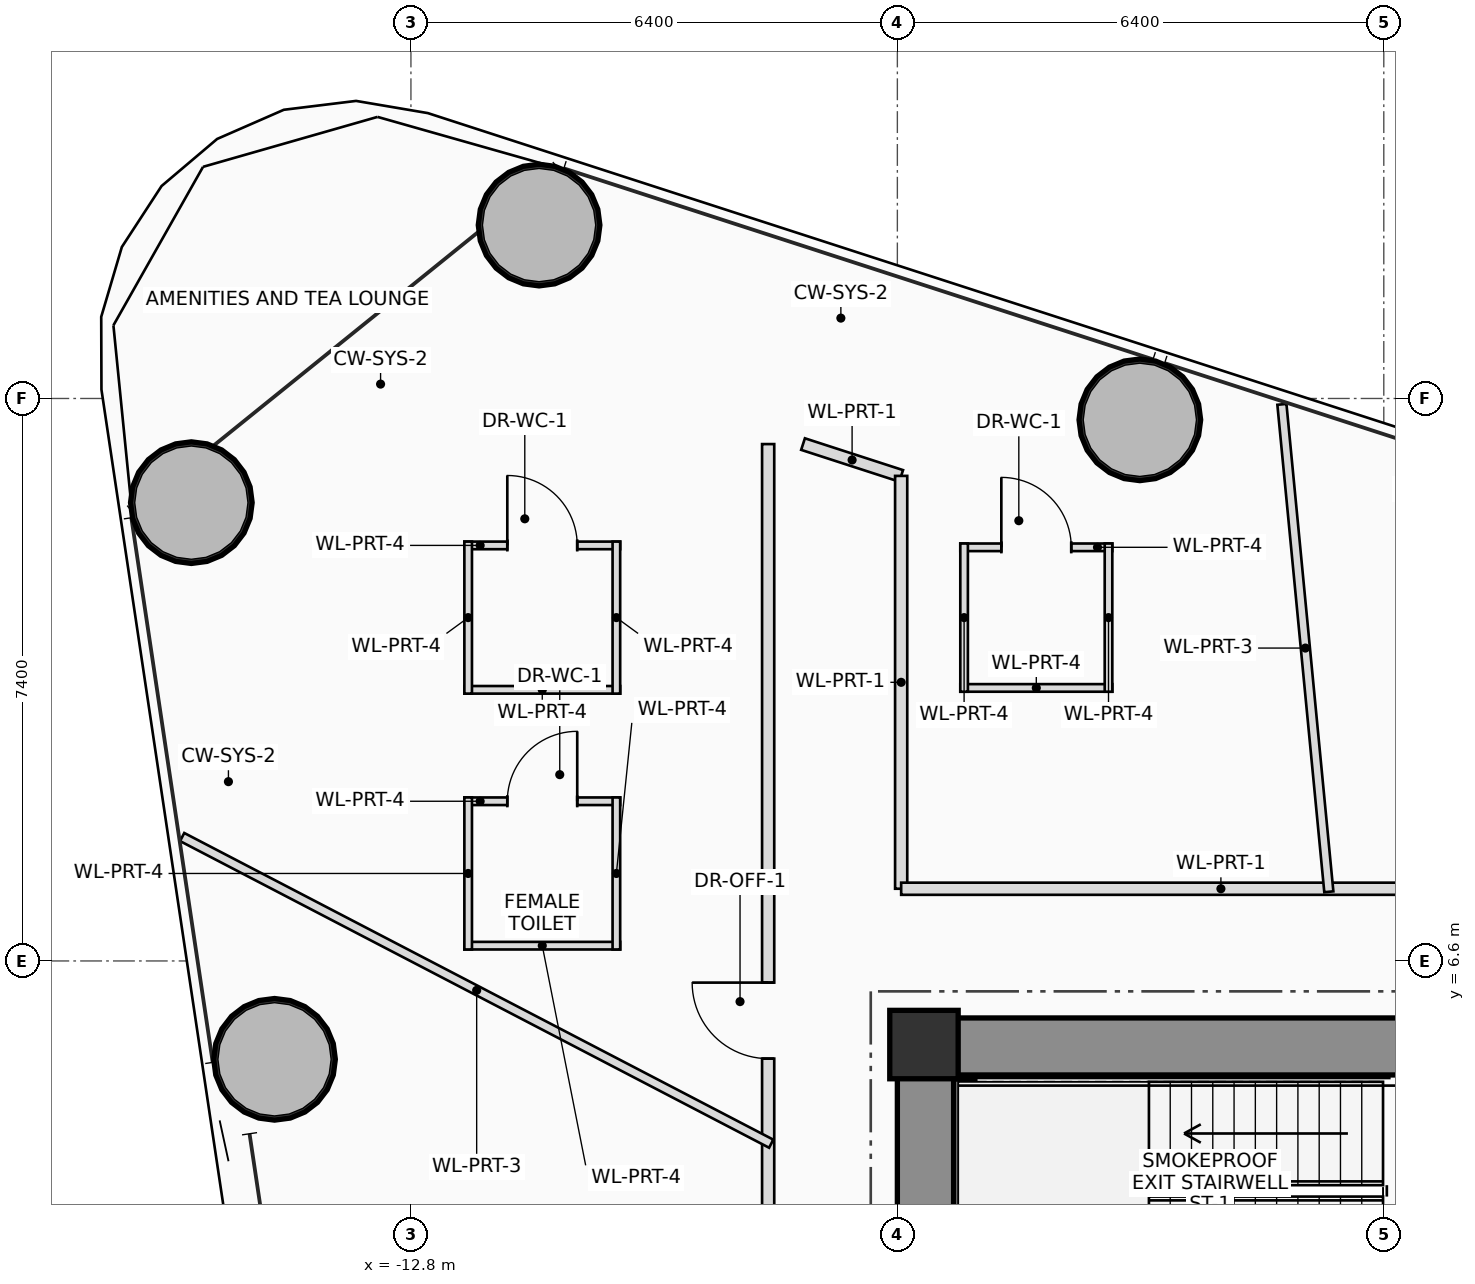
"""IFC4 building model, lengths in metres.
Left out: names, types, materials, properties, quantities, classifications, styles, units other than length and angle.
Written with IfcOpenShell. Run it as: python <this file> out.ifc"""

import sys

from ifc_helpers import new_model, si_unit, direction, frame, frame_2d, origin, origin_2d, place, context, subcontext, project, spatial, rectangle, hollow_circle, extrude, source, transform, mapped, element, fill, save


model = new_model("IFC4")
c1 = context("Model", 3, precision=1e-05, world=origin(), true_north=direction((0.0, 1.0)))
c2 = subcontext(c1, "Body", "Model", "MODEL_VIEW")
j1 = project(units=[si_unit("LENGTHUNIT", "METRE"), si_unit("PLANEANGLEUNIT", "RADIAN")], contexts=[c1])
p1 = place(None, origin())
s1 = spatial("IfcSite", under=j1, at=p1, CompositionType="ELEMENT")
p2 = place(p1, origin())
s2 = spatial("IfcBuilding", under=s1, at=p2, CompositionType="ELEMENT")
p3 = place(p2, frame((0.0, 0.0, 69.8)))
s3 = spatial("IfcBuildingStorey", under=s2, at=p3, CompositionType="ELEMENT", Elevation=69.8)
m1 = source(origin(), c2, "Body", "SweptSolid", [
    extrude(rectangle(XDim=0.9, YDim=0.9, at=origin_2d()), origin(), (0.0, 0.0, 1.0), 3.75),
])
p4 = place(p3, frame((-6.05, 5.5, 0.0), z_axis=(0.0, 0.0, 1.0), x_axis=(1.0, 0.0, 0.0)))
e1 = element("IfcColumn", 1, at=p4, inside=s3, PredefinedType="COLUMN", context=c2, shape_type="MappedRepresentation", body=[
    mapped(m1, transform((0.0, 0.0, 0.0), scale=1.0)),
])
p5 = place(p3, frame((-6.4, 5.475, 0.0), z_axis=(0.0, 0.0, 1.0), x_axis=(1.0, 0.0, 0.0)))
e2 = element("IfcWall", 2, at=p5, inside=s3, PredefinedType="SHEAR", context=c2, shape_type="SweptSolid", body=[
    extrude(rectangle(XDim=12.8, YDim=0.75, at=frame_2d((6.4, 0.0))), origin(), (0.0, 0.0, 1.0), 3.75),
])
p6 = place(p5, frame((8.6, 0.0, 0.0)))
e3 = element("IfcOpeningElement", 3, at=p6, cuts=e2, PredefinedType="OPENING", context=c2, shape_type="SweptSolid", body=[
    extrude(rectangle(XDim=1.2, YDim=2.2, at=frame_2d((0.6, 1.1))), frame((0.0, 0.385, 0.0), z_axis=(0.0, -1.0, 0.0), x_axis=(1.0, 0.0, 0.0)), (0.0, 0.0, 1.0), 0.77),
])
p7 = place(p3, frame((-6.025, 1.75, 0.0), z_axis=(0.0, 0.0, 1.0), x_axis=(0.0, 1.0, 0.0)))
e4 = element("IfcWall", 4, at=p7, inside=s3, PredefinedType="SHEAR", context=c2, shape_type="SweptSolid", body=[
    extrude(rectangle(XDim=3.35, YDim=0.75, at=frame_2d((1.675, 0.0))), origin(), (0.0, 0.0, 1.0), 3.75),
])
p8 = place(p3, frame((-5.52, 2.3, 0.0), z_axis=(0.0, 0.0, 1.0), x_axis=(0.0, 1.0, 0.0)))
e5 = element("IfcWall", 5, at=p8, inside=s3, PredefinedType="SHEAR", context=c2, shape_type="SweptSolid", body=[
    extrude(rectangle(XDim=2.75, YDim=0.28, at=frame_2d((1.375, 0.0))), origin(), (0.0, 0.0, 1.0), 3.75),
])
m2 = source(origin(), c2, "Body", "SweptSolid", [
    extrude(hollow_circle(Radius=0.8, WallThickness=0.055, at=origin_2d()), origin(), (0.0, 0.0, 1.0), 3.75),
])
for number, where, z_axis, x_axis in (
    (6, (-3.21, 13.719, 0.0), (0.0, 0.0, 1.0), (1.0, 0.0, 0.0)),
    (7, (-11.114, 16.281, 0.0), (0.0, 0.0, 1.0), (1.0, 0.0, 0.0)),
    (8, (-15.689, 12.629, 0.0), (0.0, 0.0, 1.0), (1.0, 0.0, 0.0)),
    (9, (-14.594, 5.306, 0.0), (0.0, 0.0, 1.0), (1.0, 0.0, 0.0)),
):
    element("IfcColumn", number, at=place(p3, frame(where, z_axis=z_axis, x_axis=x_axis)), inside=s3, PredefinedType="COLUMN", context=c2, shape_type="MappedRepresentation", body=[
        mapped(m2, transform((0.0, 0.0, 0.0), scale=1.0)),
    ])
p9 = place(p3, frame((-12.097, 12.067, 0.0), z_axis=(0.0, 0.0, 1.0), x_axis=(1.0, 0.0, 0.0)))
e10 = element("IfcWall", 10, at=p9, inside=s3, PredefinedType="PARTITIONING", context=c2, shape_type="SweptSolid", body=[
    extrude(rectangle(XDim=2.05, YDim=0.1, at=frame_2d((1.025, 0.0))), origin(), (0.0, 0.0, 1.0), 3.2),
])
p10 = place(p9, frame((0.565, 0.0, 0.0)))
e11 = element("IfcOpeningElement", 11, at=p10, cuts=e10, PredefinedType="OPENING", context=c2, shape_type="SweptSolid", body=[
    extrude(rectangle(XDim=0.92, YDim=2.1, at=frame_2d((0.46, 1.05))), frame((0.0, 0.06, 0.0), z_axis=(0.0, -1.0, 0.0), x_axis=(1.0, 0.0, 0.0)), (0.0, 0.0, 1.0), 0.12),
])
p11 = place(p3, frame((-10.047, 10.167, 0.0), z_axis=(0.0, 0.0, 1.0), x_axis=(-1.0, 0.0, 0.0)))
e12 = element("IfcWall", 12, at=p11, inside=s3, PredefinedType="PARTITIONING", context=c2, shape_type="SweptSolid", body=[
    extrude(rectangle(XDim=2.05, YDim=0.1, at=frame_2d((1.025, 0.0))), origin(), (0.0, 0.0, 1.0), 3.545),
])
p12 = place(p3, frame((-10.097, 12.117, 0.0), z_axis=(0.0, 0.0, 1.0), x_axis=(0.0, -1.0, 0.0)))
e13 = element("IfcWall", 13, at=p12, inside=s3, PredefinedType="PARTITIONING", context=c2, shape_type="SweptSolid", body=[
    extrude(rectangle(XDim=2.0, YDim=0.1, at=frame_2d((1.0, 0.0))), origin(), (0.0, 0.0, 1.0), 3.545),
])
p13 = place(p3, frame((-12.047, 10.117, 0.0), z_axis=(0.0, 0.0, 1.0), x_axis=(0.0, 1.0, 0.0)))
e14 = element("IfcWall", 14, at=p13, inside=s3, PredefinedType="PARTITIONING", context=c2, shape_type="SweptSolid", body=[
    extrude(rectangle(XDim=2.0, YDim=0.1, at=frame_2d((1.0, 0.0))), origin(), (0.0, 0.0, 1.0), 3.2),
])
p14 = place(p3, frame((-12.097, 8.701, 0.0), z_axis=(0.0, 0.0, 1.0), x_axis=(1.0, 0.0, 0.0)))
e15 = element("IfcWall", 15, at=p14, inside=s3, PredefinedType="PARTITIONING", context=c2, shape_type="SweptSolid", body=[
    extrude(rectangle(XDim=2.05, YDim=0.1, at=frame_2d((1.025, 0.0))), origin(), (0.0, 0.0, 1.0), 2.85),
])
p15 = place(p14, frame((0.565, 0.0, 0.0)))
e16 = element("IfcOpeningElement", 16, at=p15, cuts=e15, PredefinedType="OPENING", context=c2, shape_type="SweptSolid", body=[
    extrude(rectangle(XDim=0.92, YDim=2.1, at=frame_2d((0.46, 1.05))), frame((0.0, 0.06, 0.0), z_axis=(0.0, -1.0, 0.0), x_axis=(1.0, 0.0, 0.0)), (0.0, 0.0, 1.0), 0.12),
])
p16 = place(p3, frame((-10.047, 6.801, 0.0), z_axis=(0.0, 0.0, 1.0), x_axis=(-1.0, 0.0, 0.0)))
e17 = element("IfcWall", 17, at=p16, inside=s3, PredefinedType="PARTITIONING", context=c2, shape_type="SweptSolid", body=[
    extrude(rectangle(XDim=2.05, YDim=0.1, at=frame_2d((1.025, 0.0))), origin(), (0.0, 0.0, 1.0), 3.05),
])
p17 = place(p3, frame((-10.097, 8.751, 0.0), z_axis=(0.0, 0.0, 1.0), x_axis=(0.0, -1.0, 0.0)))
e18 = element("IfcWall", 18, at=p17, inside=s3, PredefinedType="PARTITIONING", context=c2, shape_type="SweptSolid", body=[
    extrude(rectangle(XDim=2.0, YDim=0.1, at=frame_2d((1.0, 0.0))), origin(), (0.0, 0.0, 1.0), 2.85),
])
p18 = place(p3, frame((-12.047, 6.751, 0.0), z_axis=(0.0, 0.0, 1.0), x_axis=(0.0, 1.0, 0.0)))
e19 = element("IfcWall", 19, at=p18, inside=s3, PredefinedType="PARTITIONING", context=c2, shape_type="SweptSolid", body=[
    extrude(rectangle(XDim=2.0, YDim=0.1, at=frame_2d((1.0, 0.0))), origin(), (0.0, 0.0, 1.0), 3.545),
])
p19 = place(p3, frame((-5.572, 12.042, 0.0), z_axis=(0.0, 0.0, 1.0), x_axis=(1.0, 0.0, 0.0)))
e20 = element("IfcWall", 20, at=p19, inside=s3, PredefinedType="PARTITIONING", context=c2, shape_type="SweptSolid", body=[
    extrude(rectangle(XDim=2.0, YDim=0.1, at=frame_2d((1.0, 0.0))), origin(), (0.0, 0.0, 1.0), 2.85),
])
p20 = place(p19, frame((0.54, 0.0, 0.0)))
e21 = element("IfcOpeningElement", 21, at=p20, cuts=e20, PredefinedType="OPENING", context=c2, shape_type="SweptSolid", body=[
    extrude(rectangle(XDim=0.92, YDim=2.1, at=frame_2d((0.46, 1.05))), frame((0.0, 0.06, 0.0), z_axis=(0.0, -1.0, 0.0), x_axis=(1.0, 0.0, 0.0)), (0.0, 0.0, 1.0), 0.12),
])
p21 = place(p3, frame((-3.572, 10.192, 0.0), z_axis=(0.0, 0.0, 1.0), x_axis=(-1.0, 0.0, 0.0)))
e22 = element("IfcWall", 22, at=p21, inside=s3, PredefinedType="PARTITIONING", context=c2, shape_type="SweptSolid", body=[
    extrude(rectangle(XDim=2.0, YDim=0.1, at=frame_2d((1.0, 0.0))), origin(), (0.0, 0.0, 1.0), 2.85),
])
p22 = place(p3, frame((-3.622, 12.092, 0.0), z_axis=(0.0, 0.0, 1.0), x_axis=(0.0, -1.0, 0.0)))
e23 = element("IfcWall", 23, at=p22, inside=s3, PredefinedType="PARTITIONING", context=c2, shape_type="SweptSolid", body=[
    extrude(rectangle(XDim=1.95, YDim=0.1, at=frame_2d((0.975, 0.0))), origin(), (0.0, 0.0, 1.0), 2.85),
])
p23 = place(p3, frame((-5.522, 10.142, 0.0), z_axis=(0.0, 0.0, 1.0), x_axis=(0.0, 1.0, 0.0)))
e24 = element("IfcWall", 24, at=p23, inside=s3, PredefinedType="PARTITIONING", context=c2, shape_type="SweptSolid", body=[
    extrude(rectangle(XDim=1.95, YDim=0.1, at=frame_2d((0.975, 0.0))), origin(), (0.0, 0.0, 1.0), 3.2),
])
p24 = place(p3, frame((-8.1, -7.55, 0.0), z_axis=(0.0, 0.0, 1.0), x_axis=(0.0, 1.0, 0.0)))
e25 = element("IfcWall", 25, at=p24, inside=s3, PredefinedType="PARTITIONING", context=c2, shape_type="SweptSolid", body=[
    extrude(rectangle(XDim=15.1, YDim=0.16, at=frame_2d((7.55, 0.0))), origin(), (0.0, 0.0, 1.0), 2.85),
])
p25 = place(p24, frame((8.855, 0.0, 0.0)))
e26 = element("IfcOpeningElement", 26, at=p25, cuts=e25, PredefinedType="OPENING", context=c2, shape_type="SweptSolid", body=[
    extrude(rectangle(XDim=1.0, YDim=2.25, at=frame_2d((0.5, 1.125))), frame((0.0, 0.09, 0.0), z_axis=(0.0, -1.0, 0.0), x_axis=(1.0, 0.0, 0.0)), (0.0, 0.0, 1.0), 0.18),
])
p26 = place(p24, frame((12.865, 0.0, 0.0)))
e27 = element("IfcOpeningElement", 27, at=p26, cuts=e25, PredefinedType="OPENING", context=c2, shape_type="SweptSolid", body=[
    extrude(rectangle(XDim=1.0, YDim=2.25, at=frame_2d((0.5, 1.125))), frame((0.0, 0.09, 0.0), z_axis=(0.0, -1.0, 0.0), x_axis=(1.0, 0.0, 0.0)), (0.0, 0.0, 1.0), 0.18),
])
p27 = place(p3, frame((-8.1, 7.55, 0.0), z_axis=(0.0, 0.0, 1.0), x_axis=(0.0, 1.0, 0.0)))
e28 = element("IfcWall", 28, at=p27, inside=s3, PredefinedType="PARTITIONING", context=c2, shape_type="SweptSolid", body=[
    extrude(rectangle(XDim=5.85, YDim=0.16, at=frame_2d((2.925, 0.0))), origin(), (0.0, 0.0, 1.0), 2.85),
])
p28 = place(p3, frame((-7.641, 13.4, 0.0), z_axis=(0.0, 0.0, 1.0), x_axis=(0.951277022007, -0.308337521884, 0.0)))
e29 = element("IfcWall", 29, at=p28, inside=s3, PredefinedType="PARTITIONING", context=c2, shape_type="SweptSolid", body=[
    extrude(rectangle(XDim=1.357, YDim=0.16, at=frame_2d((0.679, 0.0))), origin(), (0.0, 0.0, 1.0), 3.545),
])
p29 = place(p3, frame((-6.35, 12.981, 0.0), z_axis=(0.0, 0.0, 1.0), x_axis=(0.0, -1.0, 0.0)))
e30 = element("IfcWall", 30, at=p29, inside=s3, PredefinedType="PARTITIONING", context=c2, shape_type="SweptSolid", body=[
    extrude(rectangle(XDim=5.431, YDim=0.16, at=frame_2d((2.716, 0.0))), origin(), (0.0, 0.0, 1.0), 3.05),
])
p30 = place(p3, frame((-6.35, 7.55, 0.0), z_axis=(0.0, 0.0, 1.0), x_axis=(1.0, 0.0, 0.0)))
e31 = element("IfcWall", 31, at=p30, inside=s3, PredefinedType="PARTITIONING", context=c2, shape_type="SweptSolid", body=[
    extrude(rectangle(XDim=12.7, YDim=0.16, at=frame_2d((6.35, 0.0))), origin(), (0.0, 0.0, 1.0), 2.85),
])
p31 = place(p30, frame((8.564, 0.0, 0.0)))
e32 = element("IfcOpeningElement", 32, at=p31, cuts=e31, PredefinedType="OPENING", context=c2, shape_type="SweptSolid", body=[
    extrude(rectangle(XDim=1.0, YDim=2.25, at=frame_2d((0.5, 1.125))), frame((0.0, 0.09, 0.0), z_axis=(0.0, -1.0, 0.0), x_axis=(1.0, 0.0, 0.0)), (0.0, 0.0, 1.0), 0.18),
])
p32 = place(p3, frame((-0.723, 7.51, 0.0), z_axis=(0.0, 0.0, 1.0), x_axis=(-0.095840941038, 0.995396661648, 0.0)))
e33 = element("IfcWall", 33, at=p32, inside=s3, PredefinedType="PARTITIONING", context=c2, shape_type="SweptSolid", body=[
    extrude(rectangle(XDim=6.442, YDim=0.12, at=frame_2d((3.221, 0.0))), origin(), (0.0, 0.0, 1.0), 3.01),
])
p33 = place(p3, frame((-8.06, 4.196, 0.0), z_axis=(0.0, 0.0, 1.0), x_axis=(-0.887015422537, 0.461739797052, 0.0)))
e34 = element("IfcWall", 34, at=p33, inside=s3, PredefinedType="PARTITIONING", context=c2, shape_type="SweptSolid", body=[
    extrude(rectangle(XDim=8.738, YDim=0.12, at=frame_2d((4.369, 0.0))), origin(), (0.0, 0.0, 1.0), 2.85),
])
p34 = place(p10, origin())
e35 = element("IfcDoor", 35, at=p34, inside=s3, OperationType="SINGLE_SWING_LEFT", PredefinedType="DOOR", context=c2, shape_type="SweptSolid", body=[
    extrude(rectangle(XDim=0.92, YDim=2.1, at=frame_2d((0.46, 1.05))), frame((0.0, 0.025, 0.0), z_axis=(0.0, -1.0, 0.0), x_axis=(1.0, 0.0, 0.0)), (0.0, 0.0, 1.0), 0.05),
])
fill(e11, e35)
p35 = place(p15, origin())
e36 = element("IfcDoor", 36, at=p35, inside=s3, OperationType="SINGLE_SWING_RIGHT", PredefinedType="DOOR", context=c2, shape_type="SweptSolid", body=[
    extrude(rectangle(XDim=0.92, YDim=2.1, at=frame_2d((0.46, 1.05))), frame((0.0, 0.025, 0.0), z_axis=(0.0, -1.0, 0.0), x_axis=(1.0, 0.0, 0.0)), (0.0, 0.0, 1.0), 0.05),
])
fill(e16, e36)
p36 = place(p20, origin())
e37 = element("IfcDoor", 37, at=p36, inside=s3, OperationType="SINGLE_SWING_LEFT", PredefinedType="DOOR", context=c2, shape_type="SweptSolid", body=[
    extrude(rectangle(XDim=0.92, YDim=2.1, at=frame_2d((0.46, 1.05))), frame((0.0, 0.025, 0.0), z_axis=(0.0, -1.0, 0.0), x_axis=(1.0, 0.0, 0.0)), (0.0, 0.0, 1.0), 0.05),
])
fill(e21, e37)
p37 = place(p26, origin())
e38 = element("IfcDoor", 38, at=p37, inside=s3, OperationType="SINGLE_SWING_RIGHT", PredefinedType="DOOR", context=c2, shape_type="SweptSolid", body=[
    extrude(rectangle(XDim=1.0, YDim=2.25, at=frame_2d((0.5, 1.125))), frame((0.0, 0.025, 0.0), z_axis=(0.0, -1.0, 0.0), x_axis=(1.0, 0.0, 0.0)), (0.0, 0.0, 1.0), 0.05),
])
fill(e27, e38)
save(model, sys.argv[1])
